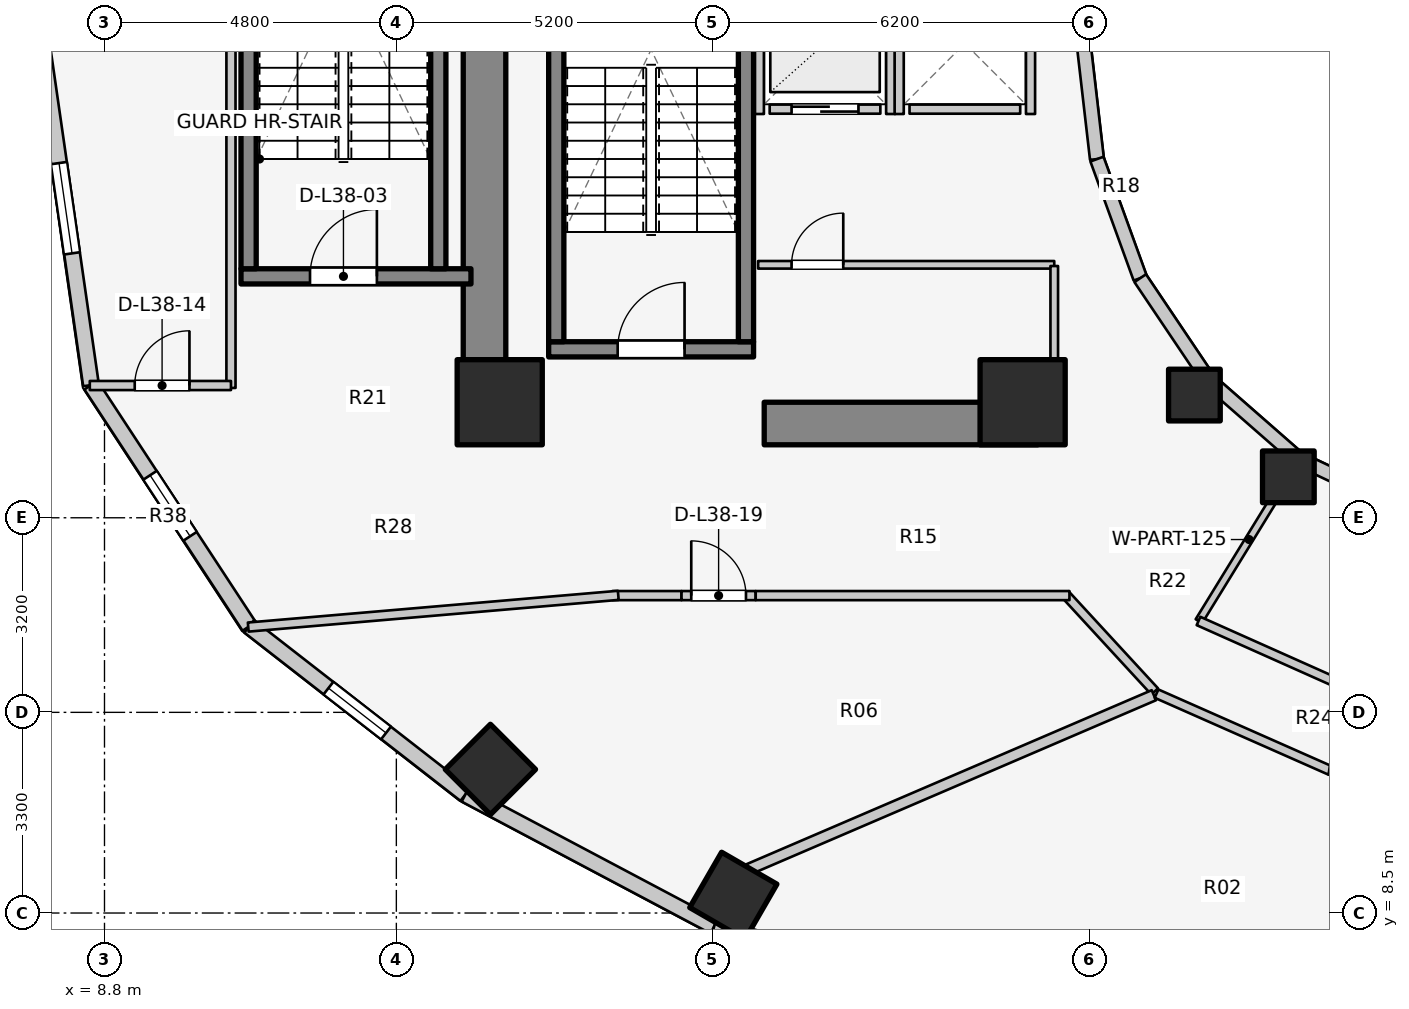
"""IFC4 building model, lengths in metres.
Left out: names, types, materials, properties, quantities, classifications, styles, units other than length and angle.
Written with IfcOpenShell. Run it as: python <this file> out.ifc"""

import sys

from ifc_helpers import new_model, si_unit, direction, frame, frame_2d, origin, origin_2d, place, context, subcontext, project, spatial, rectangle, extrude, element, fill, save


model = new_model("IFC4")
c1 = context("Model", 3, precision=1e-05, world=origin(), true_north=direction((0.0, 1.0)))
c2 = subcontext(c1, "Body", "Model", "MODEL_VIEW")
j1 = project(units=[si_unit("LENGTHUNIT", "METRE"), si_unit("PLANEANGLEUNIT", "RADIAN")], contexts=[c1])
p1 = place(None, origin())
s1 = spatial("IfcSite", under=j1, at=p1, CompositionType="ELEMENT")
p2 = place(p1, origin())
s2 = spatial("IfcBuilding", under=s1, at=p2, CompositionType="ELEMENT")
p3 = place(p2, frame((0.0, 0.0, 125.9)))
s3 = spatial("IfcBuildingStorey", under=s2, at=p3, CompositionType="ELEMENT", Elevation=125.9)
p4 = place(p3, frame((15.05, 17.05, 0.0), z_axis=(0.0, 0.0, 1.0), x_axis=(0.0, 1.0, 0.0)))
e1 = element("IfcWall", 1, at=p4, inside=s3, PredefinedType="SHEAR", context=c2, shape_type="SweptSolid", body=[
    extrude(rectangle(XDim=12.8, YDim=0.7, at=frame_2d((6.4, 0.0))), origin(), (0.0, 0.0, 1.0), 3.1),
])
p5 = place(p3, frame((19.65, 16.55, 0.0), z_axis=(0.0, 0.0, 1.0), x_axis=(1.0, 0.0, 0.0)))
e2 = element("IfcWall", 2, at=p5, inside=s3, PredefinedType="SHEAR", context=c2, shape_type="SweptSolid", body=[
    extrude(rectangle(XDim=4.5, YDim=0.7, at=frame_2d((2.25, 0.0))), origin(), (0.0, 0.0, 1.0), 3.1),
])
p6 = place(p3, frame((16.105, 17.77, 0.0), z_axis=(0.0, 0.0, 1.0), x_axis=(1.0, 0.0, 0.0)))
e3 = element("IfcWall", 3, at=p6, inside=s3, PredefinedType="SOLIDWALL", context=c2, shape_type="SweptSolid", body=[
    extrude(rectangle(XDim=3.37, YDim=0.25, at=frame_2d((1.685, 0.0))), origin(), (0.0, 0.0, 1.0), 3.1),
])
p7 = place(p6, frame((1.135, 0.0, 0.0)))
e4 = element("IfcOpeningElement", 4, at=p7, cuts=e3, PredefinedType="OPENING", context=c2, shape_type="SweptSolid", body=[
    extrude(rectangle(XDim=1.1, YDim=2.1, at=frame_2d((0.55, 1.05))), frame((0.0, 0.135, 0.0), z_axis=(0.0, -1.0, 0.0), x_axis=(1.0, 0.0, 0.0)), (0.0, 0.0, 1.0), 0.27),
])
for number, where, z_axis, x_axis in (
    (5, (16.23, 17.895, 0.0), (0.0, 0.0, 1.0), (0.0, 1.0, 0.0)),
    (6, (19.35, 17.895, 0.0), (0.0, 0.0, 1.0), (0.0, 1.0, 0.0)),
):
    element("IfcWall", number, at=place(p3, frame(where, z_axis=z_axis, x_axis=x_axis)), inside=s3, PredefinedType="SOLIDWALL", context=c2, shape_type="SweptSolid", body=[
        extrude(rectangle(XDim=7.81, YDim=0.25, at=frame_2d((3.905, 0.0))), origin(), (0.0, 0.0, 1.0), 3.1),
    ])
p8 = place(p3, frame((11.045, 18.97, 0.0), z_axis=(0.0, 0.0, 1.0), x_axis=(1.0, 0.0, 0.0)))
e7 = element("IfcWall", 7, at=p8, inside=s3, PredefinedType="SOLIDWALL", context=c2, shape_type="SweptSolid", body=[
    extrude(rectangle(XDim=3.782, YDim=0.25, at=frame_2d((1.891, 0.0))), origin(), (0.0, 0.0, 1.0), 3.1),
])
p9 = place(p8, frame((1.135, 0.0, 0.0)))
e8 = element("IfcOpeningElement", 8, at=p9, cuts=e7, PredefinedType="OPENING", context=c2, shape_type="SweptSolid", body=[
    extrude(rectangle(XDim=1.1, YDim=2.1, at=frame_2d((0.55, 1.05))), frame((0.0, 0.135, 0.0), z_axis=(0.0, -1.0, 0.0), x_axis=(1.0, 0.0, 0.0)), (0.0, 0.0, 1.0), 0.27),
])
for number, where, z_axis, x_axis in (
    (9, (11.17, 19.095, 0.0), (0.0, 0.0, 1.0), (0.0, 1.0, 0.0)),
    (10, (14.29, 19.095, 0.0), (0.0, 0.0, 1.0), (0.0, 1.0, 0.0)),
):
    element("IfcWall", number, at=place(p3, frame(where, z_axis=z_axis, x_axis=x_axis)), inside=s3, PredefinedType="SOLIDWALL", context=c2, shape_type="SweptSolid", body=[
        extrude(rectangle(XDim=7.81, YDim=0.25, at=frame_2d((3.905, 0.0))), origin(), (0.0, 0.0, 1.0), 3.1),
    ])
for number, where, z_axis, x_axis in (
    (11, (15.3, 16.9, 0.0), (0.0, 0.0, 1.0), (1.0, 0.0, 0.0)),
    (12, (23.9, 16.9, 0.0), (0.0, 0.0, 1.0), (1.0, 0.0, 0.0)),
):
    element("IfcColumn", number, at=place(p3, frame(where, z_axis=z_axis, x_axis=x_axis)), inside=s3, PredefinedType="COLUMN", context=c2, shape_type="SweptSolid", body=[
        extrude(rectangle(XDim=1.4, YDim=1.4, at=origin_2d()), origin(), (0.0, 0.0, 1.0), 3.1),
    ])
p10 = place(p3, frame((26.725, 17.018, 0.0), z_axis=(0.0, 0.0, 1.0), x_axis=(1.0, 0.0, 0.0)))
e13 = element("IfcColumn", 13, at=p10, inside=s3, PredefinedType="COLUMN", context=c2, shape_type="SweptSolid", body=[
    extrude(rectangle(XDim=0.85, YDim=0.85, at=origin_2d()), origin(), (0.0, 0.0, 1.0), 3.1),
])
p11 = place(p3, frame((15.147, 10.862, 0.0), z_axis=(0.0, 0.0, 1.0), x_axis=(-0.707106781187, -0.707106781187, 0.0)))
e14 = element("IfcColumn", 14, at=p11, inside=s3, PredefinedType="COLUMN", context=c2, shape_type="SweptSolid", body=[
    extrude(rectangle(XDim=1.05, YDim=1.05, at=origin_2d()), origin(), (0.0, 0.0, 1.0), 3.1),
])
p12 = place(p3, frame((28.27, 15.673, 0.0), z_axis=(0.0, 0.0, 1.0), x_axis=(1.0, 0.0, 0.0)))
e15 = element("IfcColumn", 15, at=p12, inside=s3, PredefinedType="COLUMN", context=c2, shape_type="SweptSolid", body=[
    extrude(rectangle(XDim=0.85, YDim=0.85, at=origin_2d()), origin(), (0.0, 0.0, 1.0), 3.1),
])
p13 = place(p3, frame((19.142, 8.782, 0.0), z_axis=(0.0, 0.0, 1.0), x_axis=(-0.5, -0.866025403784, 0.0)))
e16 = element("IfcColumn", 16, at=p13, inside=s3, PredefinedType="COLUMN", context=c2, shape_type="SweptSolid", body=[
    extrude(rectangle(XDim=1.05, YDim=1.05, at=origin_2d()), origin(), (0.0, 0.0, 1.0), 3.1),
])
p14 = place(p3, frame((24.88, 23.0, 0.0), z_axis=(0.0, 0.0, 1.0), x_axis=(0.114711713601, -0.993398823617, 0.0)))
e17 = element("IfcWall", 17, at=p14, inside=s3, PredefinedType="STANDARD", context=c2, shape_type="SweptSolid", body=[
    extrude(rectangle(XDim=2.115, YDim=0.23, at=frame_2d((1.058, 0.0))), origin(), (0.0, 0.0, 1.0), 2.56),
])
p15 = place(p3, frame((25.123, 20.898, 0.0), z_axis=(0.0, 0.0, 1.0), x_axis=(0.341423187295, -0.93990968033, 0.0)))
e18 = element("IfcWall", 18, at=p15, inside=s3, PredefinedType="STANDARD", context=c2, shape_type="SweptSolid", body=[
    extrude(rectangle(XDim=2.084, YDim=0.23, at=frame_2d((1.042, 0.0))), origin(), (0.0, 0.0, 1.0), 2.56),
])
p16 = place(p3, frame((25.834, 18.94, 0.0), z_axis=(0.0, 0.0, 1.0), x_axis=(0.558197800898, -0.829707909492, 0.0)))
e19 = element("IfcWall", 19, at=p16, inside=s3, PredefinedType="STANDARD", context=c2, shape_type="SweptSolid", body=[
    extrude(rectangle(XDim=2.027, YDim=0.23, at=frame_2d((1.013, 0.0))), origin(), (0.0, 0.0, 1.0), 1.22),
])
p17 = place(p3, frame((26.965, 17.258, 0.0), z_axis=(0.0, 0.0, 1.0), x_axis=(0.752576694707, -0.658504607869, 0.0)))
e20 = element("IfcWall", 20, at=p17, inside=s3, PredefinedType="STANDARD", context=c2, shape_type="SweptSolid", body=[
    extrude(rectangle(XDim=1.959, YDim=0.23, at=frame_2d((0.98, 0.0))), origin(), (0.0, 0.0, 1.0), 1.22),
])
p18 = place(p3, frame((28.44, 15.968, 0.0), z_axis=(0.0, 0.0, 1.0), x_axis=(0.904179699603, -0.427152280606, 0.0)))
e21 = element("IfcWall", 21, at=p18, inside=s3, PredefinedType="STANDARD", context=c2, shape_type="SweptSolid", body=[
    extrude(rectangle(XDim=1.899, YDim=0.23, at=frame_2d((0.95, 0.0))), origin(), (0.0, 0.0, 1.0), 1.22),
])
p19 = place(p3, frame((7.74, 23.0, 0.0), z_axis=(0.0, 0.0, 1.0), x_axis=(0.142572472068, -0.98978436551, 0.0)))
e22 = element("IfcWall", 22, at=p19, inside=s3, PredefinedType="STANDARD", context=c2, shape_type="SweptSolid", body=[
    extrude(rectangle(XDim=5.879, YDim=0.26, at=frame_2d((2.939, 0.0))), origin(), (0.0, 0.0, 1.0), 2.57),
])
p20 = place(p19, frame((2.189, 0.0, 0.75)))
e23 = element("IfcOpeningElement", 23, at=p20, cuts=e22, PredefinedType="OPENING", context=c2, shape_type="SweptSolid", body=[
    extrude(rectangle(XDim=1.5, YDim=1.6, at=frame_2d((0.75, 0.8))), frame((0.0, 0.14, 0.0), z_axis=(0.0, -1.0, 0.0), x_axis=(1.0, 0.0, 0.0)), (0.0, 0.0, 1.0), 0.28),
])
p21 = place(p3, frame((8.578, 17.181, 0.0), z_axis=(0.0, 0.0, 1.0), x_axis=(0.548283220945, -0.836292717672, 0.0)))
e24 = element("IfcWall", 24, at=p21, inside=s3, PredefinedType="STANDARD", context=c2, shape_type="SweptSolid", body=[
    extrude(rectangle(XDim=4.744, YDim=0.26, at=frame_2d((2.372, 0.0))), origin(), (0.0, 0.0, 1.0), 1.22),
])
p22 = place(p21, frame((1.772, 0.0, 0.15)))
e25 = element("IfcOpeningElement", 25, at=p22, cuts=e24, PredefinedType="OPENING", context=c2, shape_type="SweptSolid", body=[
    extrude(rectangle(XDim=1.2, YDim=0.9, at=frame_2d((0.6, 0.45))), frame((0.0, 0.14, 0.0), z_axis=(0.0, -1.0, 0.0), x_axis=(1.0, 0.0, 0.0)), (0.0, 0.0, 1.0), 0.28),
])
p23 = place(p3, frame((11.179, 13.214, 0.0), z_axis=(0.0, 0.0, 1.0), x_axis=(0.789127449954, -0.614229491094, 0.0)))
e26 = element("IfcWall", 26, at=p23, inside=s3, PredefinedType="STANDARD", context=c2, shape_type="SweptSolid", body=[
    extrude(rectangle(XDim=4.505, YDim=0.26, at=frame_2d((2.252, 0.0))), origin(), (0.0, 0.0, 1.0), 1.22),
])
p24 = place(p23, frame((1.652, 0.0, 0.15)))
e27 = element("IfcOpeningElement", 27, at=p24, cuts=e26, PredefinedType="OPENING", context=c2, shape_type="SweptSolid", body=[
    extrude(rectangle(XDim=1.2, YDim=0.9, at=frame_2d((0.6, 0.45))), frame((0.0, 0.14, 0.0), z_axis=(0.0, -1.0, 0.0), x_axis=(1.0, 0.0, 0.0)), (0.0, 0.0, 1.0), 0.28),
])
p25 = place(p3, frame((14.734, 10.447, 0.0), z_axis=(0.0, 0.0, 1.0), x_axis=(0.883668636807, -0.4681129568, 0.0)))
e28 = element("IfcWall", 28, at=p25, inside=s3, PredefinedType="STANDARD", context=c2, shape_type="SweptSolid", body=[
    extrude(rectangle(XDim=4.631, YDim=0.26, at=frame_2d((2.316, 0.0))), origin(), (0.0, 0.0, 1.0), 1.22),
])
p26 = place(p3, frame((18.827, 8.279, 0.0), z_axis=(0.0, 0.0, 1.0), x_axis=(0.962938491413, -0.269721081407, 0.0)))
e29 = element("IfcWall", 29, at=p26, inside=s3, PredefinedType="STANDARD", context=c2, shape_type="SweptSolid", body=[
    extrude(rectangle(XDim=5.563, YDim=0.26, at=frame_2d((2.782, 0.0))), origin(), (0.0, 0.0, 1.0), 1.22),
])
p27 = place(p26, frame((2.182, 0.0, 0.15)))
e30 = element("IfcOpeningElement", 30, at=p27, cuts=e29, PredefinedType="OPENING", context=c2, shape_type="SweptSolid", body=[
    extrude(rectangle(XDim=1.2, YDim=0.9, at=frame_2d((0.6, 0.45))), frame((0.0, 0.14, 0.0), z_axis=(0.0, -1.0, 0.0), x_axis=(1.0, 0.0, 0.0)), (0.0, 0.0, 1.0), 0.28),
])
p28 = place(p3, frame((19.74, 21.72, 0.0), z_axis=(0.0, 0.0, 1.0), x_axis=(1.0, 0.0, 0.0)))
e31 = element("IfcWall", 31, at=p28, inside=s3, PredefinedType="SOLIDWALL", context=c2, shape_type="SweptSolid", body=[
    extrude(rectangle(XDim=1.82, YDim=0.15, at=frame_2d((0.91, 0.0))), origin(), (0.0, 0.0, 1.0), 2.575),
])
p29 = place(p28, frame((0.36, 0.0, 0.0)))
e32 = element("IfcOpeningElement", 32, at=p29, cuts=e31, PredefinedType="OPENING", context=c2, shape_type="SweptSolid", body=[
    extrude(rectangle(XDim=1.1, YDim=2.1, at=frame_2d((0.55, 1.05))), frame((0.0, 0.085, 0.0), z_axis=(0.0, -1.0, 0.0), x_axis=(1.0, 0.0, 0.0)), (0.0, 0.0, 1.0), 0.17),
])
for number, where, z_axis, x_axis in (
    (33, (19.57, 21.64, 0.0), (0.0, 0.0, 1.0), (0.0, 1.0, 0.0)),
    (34, (21.73, 21.64, 0.0), (0.0, 0.0, 1.0), (0.0, 1.0, 0.0)),
):
    element("IfcWall", number, at=place(p3, frame(where, z_axis=z_axis, x_axis=x_axis)), inside=s3, PredefinedType="SOLIDWALL", context=c2, shape_type="SweptSolid", body=[
        extrude(rectangle(XDim=2.32, YDim=0.15, at=frame_2d((1.16, 0.0))), origin(), (0.0, 0.0, 1.0), 2.575),
    ])
p30 = place(p3, frame((22.04, 21.72, 0.0), z_axis=(0.0, 0.0, 1.0), x_axis=(1.0, 0.0, 0.0)))
e35 = element("IfcWall", 35, at=p30, inside=s3, PredefinedType="SOLIDWALL", context=c2, shape_type="SweptSolid", body=[
    extrude(rectangle(XDim=1.82, YDim=0.15, at=frame_2d((0.91, 0.0))), origin(), (0.0, 0.0, 1.0), 2.12),
])
p31 = place(p3, frame((21.87, 21.64, 0.0), z_axis=(0.0, 0.0, 1.0), x_axis=(0.0, 1.0, 0.0)))
e36 = element("IfcWall", 36, at=p31, inside=s3, PredefinedType="SOLIDWALL", context=c2, shape_type="SweptSolid", body=[
    extrude(rectangle(XDim=2.32, YDim=0.15, at=frame_2d((1.16, 0.0))), origin(), (0.0, 0.0, 1.0), 2.575),
])
p32 = place(p3, frame((24.03, 21.64, 0.0), z_axis=(0.0, 0.0, 1.0), x_axis=(0.0, 1.0, 0.0)))
e37 = element("IfcWall", 37, at=p32, inside=s3, PredefinedType="SOLIDWALL", context=c2, shape_type="SweptSolid", body=[
    extrude(rectangle(XDim=2.32, YDim=0.15, at=frame_2d((1.16, 0.0))), origin(), (0.0, 0.0, 1.0), 2.12),
])
p33 = place(p3, frame((19.55, 19.16, 0.0), z_axis=(0.0, 0.0, 1.0), x_axis=(1.0, 0.0, 0.0)))
e38 = element("IfcWall", 38, at=p33, inside=s3, PredefinedType="PARTITIONING", context=c2, shape_type="SweptSolid", body=[
    extrude(rectangle(XDim=4.87, YDim=0.125, at=frame_2d((2.435, 0.0))), origin(), (0.0, 0.0, 1.0), 2.12),
])
p34 = place(p33, frame((0.55, 0.0, 0.0)))
e39 = element("IfcOpeningElement", 39, at=p34, cuts=e38, PredefinedType="OPENING", context=c2, shape_type="SweptSolid", body=[
    extrude(rectangle(XDim=0.85, YDim=2.05, at=frame_2d((0.425, 1.025))), frame((0.0, 0.073, 0.0), z_axis=(0.0, -1.0, 0.0), x_axis=(1.0, 0.0, 0.0)), (0.0, 0.0, 1.0), 0.145),
])
p35 = place(p3, frame((24.42, 17.1, 0.0), z_axis=(0.0, 0.0, 1.0), x_axis=(0.0, 1.0, 0.0)))
e40 = element("IfcWall", 40, at=p35, inside=s3, PredefinedType="PARTITIONING", context=c2, shape_type="SweptSolid", body=[
    extrude(rectangle(XDim=2.04, YDim=0.125, at=frame_2d((1.02, 0.0))), origin(), (0.0, 0.0, 1.0), 1.873),
])
p36 = place(p3, frame((10.88, 17.135, 0.0), z_axis=(0.0, 0.0, 1.0), x_axis=(0.0, 1.0, 0.0)))
e41 = element("IfcWall", 41, at=p36, inside=s3, PredefinedType="PARTITIONING", context=c2, shape_type="SweptSolid", body=[
    extrude(rectangle(XDim=11.73, YDim=0.15, at=frame_2d((5.865, 0.0))), origin(), (0.0, 0.0, 1.0), 2.12),
])
p37 = place(p3, frame((8.558, 17.175, 0.0), z_axis=(0.0, 0.0, 1.0), x_axis=(1.0, 0.0, 0.0)))
e42 = element("IfcWall", 42, at=p37, inside=s3, PredefinedType="PARTITIONING", context=c2, shape_type="SweptSolid", body=[
    extrude(rectangle(XDim=2.322, YDim=0.15, at=frame_2d((1.161, 0.0))), origin(), (0.0, 0.0, 1.0), 2.575),
])
p38 = place(p37, frame((0.739, 0.0, 0.0)))
e43 = element("IfcOpeningElement", 43, at=p38, cuts=e42, PredefinedType="OPENING", context=c2, shape_type="SweptSolid", body=[
    extrude(rectangle(XDim=0.9, YDim=2.1, at=frame_2d((0.45, 1.05))), frame((0.0, 0.085, 0.0), z_axis=(0.0, -1.0, 0.0), x_axis=(1.0, 0.0, 0.0)), (0.0, 0.0, 1.0), 0.17),
])
p39 = place(p3, frame((26.072, 12.144, 0.0), z_axis=(0.0, 0.0, 1.0), x_axis=(-0.677579737957, 0.735449317567, 0.0)))
e44 = element("IfcWall", 44, at=p39, inside=s3, PredefinedType="PARTITIONING", context=c2, shape_type="SweptSolid", body=[
    extrude(rectangle(XDim=2.173, YDim=0.15, at=frame_2d((1.086, 0.0))), origin(), (0.0, 0.0, 1.0), 1.22),
])
p40 = place(p3, frame((17.15, 13.72, 0.0), z_axis=(0.0, 0.0, 1.0), x_axis=(1.0, 0.0, 0.0)))
e45 = element("IfcWall", 45, at=p40, inside=s3, PredefinedType="PARTITIONING", context=c2, shape_type="SweptSolid", body=[
    extrude(rectangle(XDim=1.14, YDim=0.15, at=frame_2d((0.57, 0.0))), origin(), (0.0, 0.0, 1.0), 2.575),
])
p41 = place(p3, frame((18.29, 13.72, 0.0), z_axis=(0.0, 0.0, 1.0), x_axis=(1.0, 0.0, 0.0)))
e46 = element("IfcWall", 46, at=p41, inside=s3, PredefinedType="PARTITIONING", context=c2, shape_type="SweptSolid", body=[
    extrude(rectangle(XDim=1.22, YDim=0.15, at=frame_2d((0.61, 0.0))), origin(), (0.0, 0.0, 1.0), 2.16),
])
p42 = place(p41, frame((0.16, 0.0, 0.0)))
e47 = element("IfcOpeningElement", 47, at=p42, cuts=e46, PredefinedType="OPENING", context=c2, shape_type="SweptSolid", body=[
    extrude(rectangle(XDim=0.9, YDim=2.1, at=frame_2d((0.45, 1.05))), frame((0.0, 0.085, 0.0), z_axis=(0.0, -1.0, 0.0), x_axis=(1.0, 0.0, 0.0)), (0.0, 0.0, 1.0), 0.17),
])
p43 = place(p3, frame((19.51, 13.72, 0.0), z_axis=(0.0, 0.0, 1.0), x_axis=(1.0, 0.0, 0.0)))
e48 = element("IfcWall", 48, at=p43, inside=s3, PredefinedType="PARTITIONING", context=c2, shape_type="SweptSolid", body=[
    extrude(rectangle(XDim=5.16, YDim=0.15, at=frame_2d((2.58, 0.0))), origin(), (0.0, 0.0, 1.0), 1.22),
])
p44 = place(p3, frame((17.25, 13.724, 0.0), z_axis=(0.0, 0.0, 1.0), x_axis=(-0.996341886029, -0.085456691633, 0.0)))
e49 = element("IfcWall", 49, at=p44, inside=s3, PredefinedType="PARTITIONING", context=c2, shape_type="SweptSolid", body=[
    extrude(rectangle(XDim=6.108, YDim=0.15, at=frame_2d((3.054, 0.0))), origin(), (0.0, 0.0, 1.0), 1.22),
])
p45 = place(p3, frame((28.45, 15.985, 0.0), z_axis=(0.0, 0.0, 1.0), x_axis=(-0.523587550846, -0.851971875474, 0.0)))
e50 = element("IfcWall", 50, at=p45, inside=s3, PredefinedType="PARTITIONING", context=c2, shape_type="SweptSolid", body=[
    extrude(rectangle(XDim=3.153, YDim=0.125, at=frame_2d((1.577, 0.0))), origin(), (0.0, 0.0, 1.0), 1.22),
])
p46 = place(p3, frame((26.793, 13.303, 0.0), z_axis=(0.0, 0.0, 1.0), x_axis=(0.913145536541, -0.407633694749, 0.0)))
e51 = element("IfcWall", 51, at=p46, inside=s3, PredefinedType="PARTITIONING", context=c2, shape_type="SweptSolid", body=[
    extrude(rectangle(XDim=2.756, YDim=0.15, at=frame_2d((1.378, 0.0))), origin(), (0.0, 0.0, 1.0), 1.22),
])
p47 = place(p3, frame((26.059, 12.082, 0.0), z_axis=(0.0, 0.0, 1.0), x_axis=(-0.918836579087, -0.394638240584, 0.0)))
e52 = element("IfcWall", 52, at=p47, inside=s3, PredefinedType="PARTITIONING", context=c2, shape_type="SweptSolid", body=[
    extrude(rectangle(XDim=7.253, YDim=0.18, at=frame_2d((3.626, 0.0))), origin(), (0.0, 0.0, 1.0), 1.22),
])
p48 = place(p3, frame((26.102, 12.108, 0.0), z_axis=(0.0, 0.0, 1.0), x_axis=(0.914519212393, -0.40454247016, 0.0)))
e53 = element("IfcWall", 53, at=p48, inside=s3, PredefinedType="PARTITIONING", context=c2, shape_type="SweptSolid", body=[
    extrude(rectangle(XDim=3.124, YDim=0.15, at=frame_2d((1.562, 0.0))), origin(), (0.0, 0.0, 1.0), 1.22),
])
p49 = place(p3, frame((28.943, 10.849, 0.0), z_axis=(0.0, 0.0, 1.0), x_axis=(0.990238800444, -0.139381197064, 0.0)))
e54 = element("IfcWall", 54, at=p49, inside=s3, PredefinedType="PARTITIONING", context=c2, shape_type="SweptSolid", body=[
    extrude(rectangle(XDim=0.888, YDim=0.15, at=frame_2d((0.444, 0.0))), origin(), (0.0, 0.0, 1.0), 2.105),
])
p50 = place(p20, origin())
e55 = element("IfcWindow", 55, at=p50, inside=s3, PartitioningType="SINGLE_PANEL", PredefinedType="WINDOW", context=c2, shape_type="SweptSolid", body=[
    extrude(rectangle(XDim=1.5, YDim=1.6, at=frame_2d((0.75, 0.8))), frame((0.0, 0.03, 0.0), z_axis=(0.0, -1.0, 0.0), x_axis=(1.0, 0.0, 0.0)), (0.0, 0.0, 1.0), 0.06),
])
fill(e23, e55)
p51 = place(p22, origin())
e56 = element("IfcWindow", 56, at=p51, inside=s3, PartitioningType="SINGLE_PANEL", PredefinedType="WINDOW", context=c2, shape_type="SweptSolid", body=[
    extrude(rectangle(XDim=1.2, YDim=0.9, at=frame_2d((0.6, 0.45))), frame((0.0, 0.03, 0.0), z_axis=(0.0, -1.0, 0.0), x_axis=(1.0, 0.0, 0.0)), (0.0, 0.0, 1.0), 0.06),
])
fill(e25, e56)
p52 = place(p24, origin())
e57 = element("IfcWindow", 57, at=p52, inside=s3, PartitioningType="SINGLE_PANEL", PredefinedType="WINDOW", context=c2, shape_type="SweptSolid", body=[
    extrude(rectangle(XDim=1.2, YDim=0.9, at=frame_2d((0.6, 0.45))), frame((0.0, 0.03, 0.0), z_axis=(0.0, -1.0, 0.0), x_axis=(1.0, 0.0, 0.0)), (0.0, 0.0, 1.0), 0.06),
])
fill(e27, e57)
p53 = place(p7, origin())
e58 = element("IfcDoor", 58, at=p53, inside=s3, OperationType="SINGLE_SWING_RIGHT", PredefinedType="DOOR", context=c2, shape_type="SweptSolid", body=[
    extrude(rectangle(XDim=1.1, YDim=2.1, at=frame_2d((0.55, 1.05))), frame((0.0, 0.025, 0.0), z_axis=(0.0, -1.0, 0.0), x_axis=(1.0, 0.0, 0.0)), (0.0, 0.0, 1.0), 0.05),
])
fill(e4, e58)
p54 = place(p9, origin())
e59 = element("IfcDoor", 59, at=p54, inside=s3, OperationType="SINGLE_SWING_RIGHT", PredefinedType="DOOR", context=c2, shape_type="SweptSolid", body=[
    extrude(rectangle(XDim=1.1, YDim=2.1, at=frame_2d((0.55, 1.05))), frame((0.0, 0.025, 0.0), z_axis=(0.0, -1.0, 0.0), x_axis=(1.0, 0.0, 0.0)), (0.0, 0.0, 1.0), 0.05),
])
fill(e8, e59)
p55 = place(p29, origin())
e60 = element("IfcDoor", 60, at=p55, inside=s3, OperationType="DOUBLE_DOOR_SLIDING", PredefinedType="DOOR", context=c2, shape_type="SweptSolid", body=[
    extrude(rectangle(XDim=1.1, YDim=2.1, at=frame_2d((0.55, 1.05))), frame((0.0, 0.025, 0.0), z_axis=(0.0, -1.0, 0.0), x_axis=(1.0, 0.0, 0.0)), (0.0, 0.0, 1.0), 0.05),
])
fill(e32, e60)
p56 = place(p34, origin())
e61 = element("IfcDoor", 61, at=p56, inside=s3, OperationType="SINGLE_SWING_RIGHT", PredefinedType="DOOR", context=c2, shape_type="SweptSolid", body=[
    extrude(rectangle(XDim=0.85, YDim=2.05, at=frame_2d((0.425, 1.025))), frame((0.0, 0.025, 0.0), z_axis=(0.0, -1.0, 0.0), x_axis=(1.0, 0.0, 0.0)), (0.0, 0.0, 1.0), 0.05),
])
fill(e39, e61)
p57 = place(p38, origin())
e62 = element("IfcDoor", 62, at=p57, inside=s3, OperationType="SINGLE_SWING_RIGHT", PredefinedType="DOOR", context=c2, shape_type="SweptSolid", body=[
    extrude(rectangle(XDim=0.9, YDim=2.1, at=frame_2d((0.45, 1.05))), frame((0.0, 0.025, 0.0), z_axis=(0.0, -1.0, 0.0), x_axis=(1.0, 0.0, 0.0)), (0.0, 0.0, 1.0), 0.05),
])
fill(e43, e62)
p58 = place(p42, origin())
e63 = element("IfcDoor", 63, at=p58, inside=s3, OperationType="SINGLE_SWING_LEFT", PredefinedType="DOOR", context=c2, shape_type="SweptSolid", body=[
    extrude(rectangle(XDim=0.9, YDim=2.1, at=frame_2d((0.45, 1.05))), frame((0.0, 0.025, 0.0), z_axis=(0.0, -1.0, 0.0), x_axis=(1.0, 0.0, 0.0)), (0.0, 0.0, 1.0), 0.05),
])
fill(e47, e63)
save(model, sys.argv[1])
